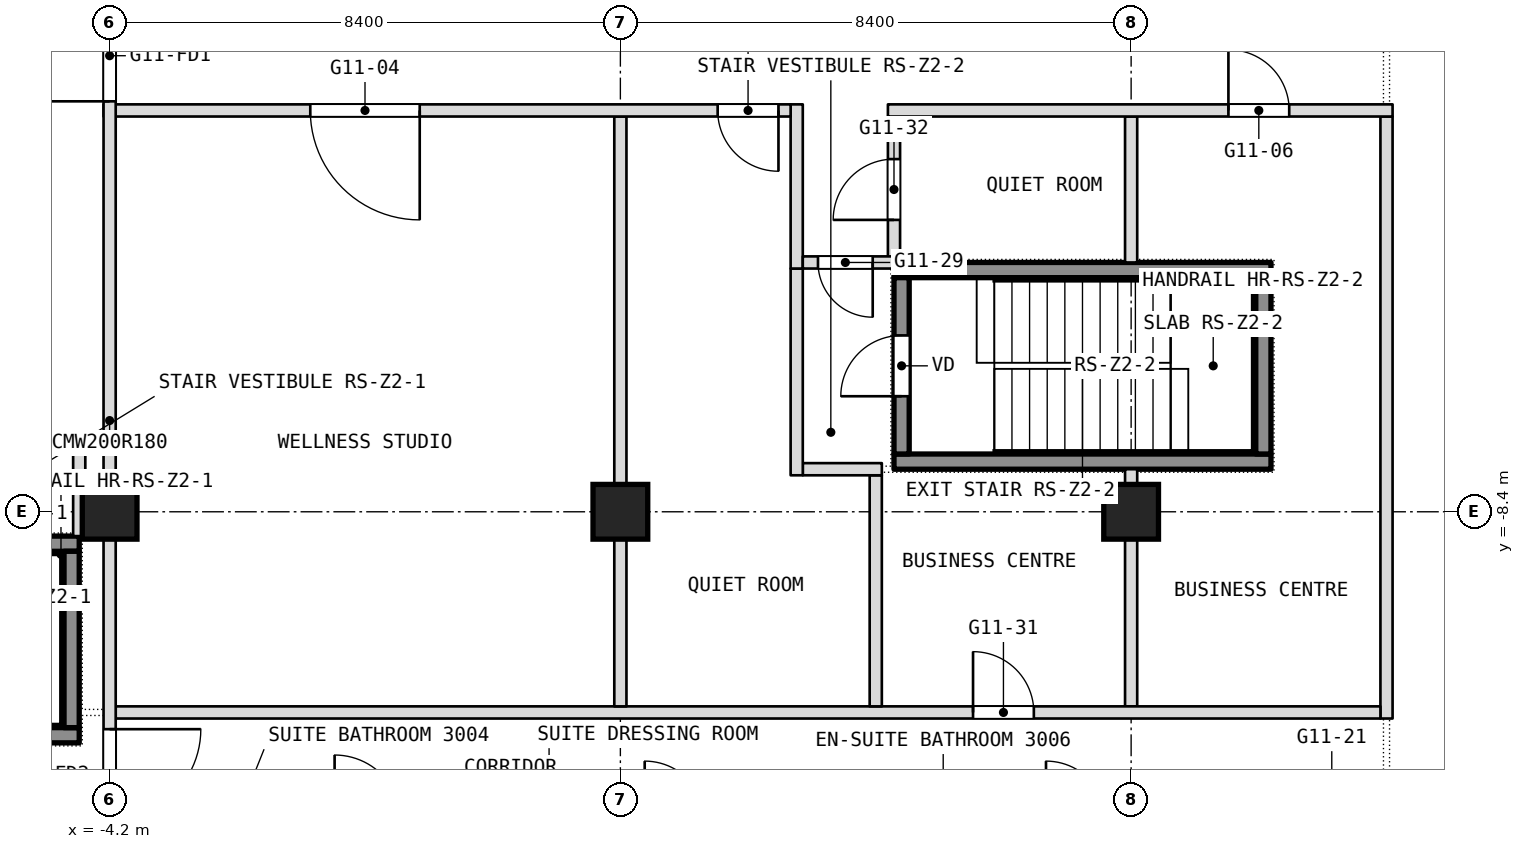
"""IFC4 building model, lengths in metres.
Left out: names, types, materials, properties, quantities, classifications, styles, units other than length and angle.
Written with IfcOpenShell. Run it as: python <this file> out.ifc"""

import sys

from ifc_helpers import new_model, si_unit, direction, frame, frame_2d, origin, origin_2d, place, context, subcontext, project, spatial, rectangle, extrude, element, fill, save


model = new_model("IFC4")
c1 = context("Model", 3, precision=1e-05, world=origin(), true_north=direction((0.0, 1.0)))
c2 = subcontext(c1, "Body", "Model", "MODEL_VIEW")
j1 = project(units=[si_unit("LENGTHUNIT", "METRE"), si_unit("PLANEANGLEUNIT", "RADIAN")], contexts=[c1])
p1 = place(None, origin())
s1 = spatial("IfcSite", under=j1, at=p1, CompositionType="ELEMENT")
p2 = place(p1, origin())
s2 = spatial("IfcBuilding", under=s1, at=p2, CompositionType="ELEMENT")
p3 = place(p2, frame((0.0, 0.0, 133.7)))
s3 = spatial("IfcBuildingStorey", under=s2, at=p3, CompositionType="ELEMENT", Elevation=133.7)
for number, where, z_axis, x_axis in (
    (1, (-4.2, -8.4, 0.0), (0.0, 0.0, 1.0), (1.0, 0.0, 0.0)),
    (2, (4.2, -8.4, 0.0), (0.0, 0.0, 1.0), (1.0, 0.0, 0.0)),
    (3, (12.6, -8.4, 0.0), (0.0, 0.0, 1.0), (1.0, 0.0, 0.0)),
):
    element("IfcColumn", number, at=place(p3, frame(where, z_axis=z_axis, x_axis=x_axis)), inside=s3, PredefinedType="COLUMN", context=c2, shape_type="SweptSolid", body=[
        extrude(rectangle(XDim=0.9, YDim=0.9, at=origin_2d()), origin(), (0.0, 0.0, 1.0), 3.6),
    ])
p4 = place(p3, frame((16.8, -11.8, 0.0), z_axis=(0.0, 0.0, 1.0), x_axis=(0.0, 1.0, 0.0)))
e4 = element("IfcWall", 4, at=p4, inside=s3, PredefinedType="PARTITIONING", context=c2, shape_type="SweptSolid", body=[
    extrude(rectangle(XDim=9.9, YDim=0.2, at=frame_2d((4.95, 0.0))), origin(), (0.0, 0.0, 1.0), 3.34),
])
p5 = place(p3, frame((12.6, -11.6, 0.0), z_axis=(0.0, 0.0, 1.0), x_axis=(0.0, 1.0, 0.0)))
e5 = element("IfcWall", 5, at=p5, inside=s3, PredefinedType="PARTITIONING", context=c2, shape_type="SweptSolid", body=[
    extrude(rectangle(XDim=3.9, YDim=0.2, at=frame_2d((1.95, 0.0))), origin(), (0.0, 0.0, 1.0), 3.34),
])
p6 = place(p3, frame((12.6, -4.3, 0.0), z_axis=(0.0, 0.0, 1.0), x_axis=(0.0, 1.0, 0.0)))
e6 = element("IfcWall", 6, at=p6, inside=s3, PredefinedType="PARTITIONING", context=c2, shape_type="SweptSolid", body=[
    extrude(rectangle(XDim=2.4, YDim=0.2, at=frame_2d((1.2, 0.0))), origin(), (0.0, 0.0, 1.0), 3.34),
])
p7 = place(p3, frame((-4.1, -11.7, 0.0), z_axis=(0.0, 0.0, 1.0), x_axis=(1.0, 0.0, 0.0)))
e7 = element("IfcWall", 7, at=p7, inside=s3, PredefinedType="PARTITIONING", context=c2, shape_type="SweptSolid", body=[
    extrude(rectangle(XDim=20.8, YDim=0.2, at=frame_2d((10.4, 0.0))), origin(), (0.0, 0.0, 1.0), 3.34),
])
p8 = place(p7, frame((14.1, 0.0, 0.0)))
e8 = element("IfcOpeningElement", 8, at=p8, cuts=e7, PredefinedType="OPENING", context=c2, shape_type="SweptSolid", body=[
    extrude(rectangle(XDim=1.0, YDim=2.1, at=frame_2d((0.5, 1.05))), frame((0.0, 0.1, 0.0), z_axis=(0.0, -1.0, 0.0), x_axis=(1.0, 0.0, 0.0)), (0.0, 0.0, 1.0), 0.2),
])
p9 = place(p3, frame((8.7, -4.3, 0.0), z_axis=(0.0, 0.0, 1.0), x_axis=(0.0, 1.0, 0.0)))
e9 = element("IfcWall", 9, at=p9, inside=s3, PredefinedType="PARTITIONING", context=c2, shape_type="SweptSolid", body=[
    extrude(rectangle(XDim=2.4, YDim=0.2, at=frame_2d((1.2, 0.0))), origin(), (0.0, 0.0, 1.0), 3.34),
])
p10 = place(p9, frame((0.7, 0.0, 0.0)))
e10 = element("IfcOpeningElement", 10, at=p10, cuts=e9, PredefinedType="OPENING", context=c2, shape_type="SweptSolid", body=[
    extrude(rectangle(XDim=1.0, YDim=2.1, at=frame_2d((0.5, 1.05))), frame((0.0, 0.1, 0.0), z_axis=(0.0, -1.0, 0.0), x_axis=(1.0, 0.0, 0.0)), (0.0, 0.0, 1.0), 0.2),
])
p11 = place(p3, frame((8.4, -11.6, 0.0), z_axis=(0.0, 0.0, 1.0), x_axis=(0.0, 1.0, 0.0)))
e11 = element("IfcWall", 11, at=p11, inside=s3, PredefinedType="PARTITIONING", context=c2, shape_type="SweptSolid", body=[
    extrude(rectangle(XDim=3.8, YDim=0.2, at=frame_2d((1.9, 0.0))), origin(), (0.0, 0.0, 1.0), 3.34),
])
p12 = place(p3, frame((7.2, -7.7, 0.0), z_axis=(0.0, 0.0, 1.0), x_axis=(1.0, 0.0, 0.0)))
e12 = element("IfcWall", 12, at=p12, inside=s3, PredefinedType="PARTITIONING", context=c2, shape_type="SweptSolid", body=[
    extrude(rectangle(XDim=1.3, YDim=0.2, at=frame_2d((0.65, 0.0))), origin(), (0.0, 0.0, 1.0), 3.34),
])
p13 = place(p3, frame((-8.5, -7.2, 0.0), z_axis=(0.0, 0.0, 1.0), x_axis=(1.0, 0.0, 0.0)))
e13 = element("IfcWall", 13, at=p13, inside=s3, PredefinedType="PARTITIONING", context=c2, shape_type="SweptSolid", body=[
    extrude(rectangle(XDim=3.7, YDim=0.2, at=frame_2d((1.85, 0.0))), origin(), (0.0, 0.0, 1.0), 3.34),
])
p14 = place(p13, frame((0.25, 0.0, 0.0)))
e14 = element("IfcOpeningElement", 14, at=p14, cuts=e13, PredefinedType="OPENING", context=c2, shape_type="SweptSolid", body=[
    extrude(rectangle(XDim=0.9, YDim=2.1, at=frame_2d((0.45, 1.05))), frame((0.0, 0.1, 0.0), z_axis=(0.0, -1.0, 0.0), x_axis=(1.0, 0.0, 0.0)), (0.0, 0.0, 1.0), 0.2),
])
p15 = place(p3, frame((7.1, -7.8, 0.0), z_axis=(0.0, 0.0, 1.0), x_axis=(0.0, 1.0, 0.0)))
e15 = element("IfcWall", 15, at=p15, inside=s3, PredefinedType="PARTITIONING", context=c2, shape_type="SweptSolid", body=[
    extrude(rectangle(XDim=3.4, YDim=0.2, at=frame_2d((1.7, 0.0))), origin(), (0.0, 0.0, 1.0), 3.34),
])
p16 = place(p3, frame((7.1, -4.4, 0.0), z_axis=(0.0, 0.0, 1.0), x_axis=(0.0, 1.0, 0.0)))
e16 = element("IfcWall", 16, at=p16, inside=s3, PredefinedType="PARTITIONING", context=c2, shape_type="SweptSolid", body=[
    extrude(rectangle(XDim=2.7, YDim=0.2, at=frame_2d((1.35, 0.0))), origin(), (0.0, 0.0, 1.0), 3.34),
])
p17 = place(p3, frame((7.2, -4.3, 0.0), z_axis=(0.0, 0.0, 1.0), x_axis=(1.0, 0.0, 0.0)))
e17 = element("IfcWall", 17, at=p17, inside=s3, PredefinedType="PARTITIONING", context=c2, shape_type="SweptSolid", body=[
    extrude(rectangle(XDim=1.5, YDim=0.2, at=frame_2d((0.75, 0.0))), origin(), (0.0, 0.0, 1.0), 3.34),
])
p18 = place(p17, frame((0.25, 0.0, 0.0)))
e18 = element("IfcOpeningElement", 18, at=p18, cuts=e17, PredefinedType="OPENING", context=c2, shape_type="SweptSolid", body=[
    extrude(rectangle(XDim=0.9, YDim=2.1, at=frame_2d((0.45, 1.05))), frame((0.0, 0.1, 0.0), z_axis=(0.0, -1.0, 0.0), x_axis=(1.0, 0.0, 0.0)), (0.0, 0.0, 1.0), 0.2),
])
p19 = place(p3, frame((4.2, -11.6, 0.0), z_axis=(0.0, 0.0, 1.0), x_axis=(0.0, 1.0, 0.0)))
e19 = element("IfcWall", 19, at=p19, inside=s3, PredefinedType="PARTITIONING", context=c2, shape_type="SweptSolid", body=[
    extrude(rectangle(XDim=9.7, YDim=0.2, at=frame_2d((4.85, 0.0))), origin(), (0.0, 0.0, 1.0), 3.34),
])
p20 = place(p3, frame((-4.3, -1.8, 0.0), z_axis=(0.0, 0.0, 1.0), x_axis=(1.0, 0.0, 0.0)))
e20 = element("IfcWall", 20, at=p20, inside=s3, PredefinedType="PARTITIONING", context=c2, shape_type="SweptSolid", body=[
    extrude(rectangle(XDim=11.3, YDim=0.2, at=frame_2d((5.65, 0.0))), origin(), (0.0, 0.0, 1.0), 3.34),
])
p21 = place(p20, frame((3.4, 0.0, 0.0)))
e21 = element("IfcOpeningElement", 21, at=p21, cuts=e20, PredefinedType="OPENING", context=c2, shape_type="SweptSolid", body=[
    extrude(rectangle(XDim=1.8, YDim=2.1, at=frame_2d((0.9, 1.05))), frame((0.0, 0.1, 0.0), z_axis=(0.0, -1.0, 0.0), x_axis=(1.0, 0.0, 0.0)), (0.0, 0.0, 1.0), 0.2),
])
p22 = place(p20, frame((10.1, 0.0, 0.0)))
e22 = element("IfcOpeningElement", 22, at=p22, cuts=e20, PredefinedType="OPENING", context=c2, shape_type="SweptSolid", body=[
    extrude(rectangle(XDim=1.0, YDim=2.1, at=frame_2d((0.5, 1.05))), frame((0.0, 0.1, 0.0), z_axis=(0.0, -1.0, 0.0), x_axis=(1.0, 0.0, 0.0)), (0.0, 0.0, 1.0), 0.2),
])
p23 = place(p3, frame((8.6, -1.8, 0.0), z_axis=(0.0, 0.0, 1.0), x_axis=(1.0, 0.0, 0.0)))
e23 = element("IfcWall", 23, at=p23, inside=s3, PredefinedType="PARTITIONING", context=c2, shape_type="SweptSolid", body=[
    extrude(rectangle(XDim=8.3, YDim=0.2, at=frame_2d((4.15, 0.0))), origin(), (0.0, 0.0, 1.0), 3.34),
])
p24 = place(p23, frame((5.6, 0.0, 0.0)))
e24 = element("IfcOpeningElement", 24, at=p24, cuts=e23, PredefinedType="OPENING", context=c2, shape_type="SweptSolid", body=[
    extrude(rectangle(XDim=1.0, YDim=2.1, at=frame_2d((0.5, 1.05))), frame((0.0, 0.1, 0.0), z_axis=(0.0, -1.0, 0.0), x_axis=(1.0, 0.0, 0.0)), (0.0, 0.0, 1.0), 0.2),
])
p25 = place(p3, frame((-4.2, -13.8, 0.0), z_axis=(0.0, 0.0, 1.0), x_axis=(0.0, 1.0, 0.0)))
e25 = element("IfcWall", 25, at=p25, inside=s3, PredefinedType="PARTITIONING", context=c2, shape_type="SweptSolid", body=[
    extrude(rectangle(XDim=13.8, YDim=0.2, at=frame_2d((6.9, 0.0))), origin(), (0.0, 0.0, 1.0), 3.34),
])
p26 = place(p25, frame((12.15, 0.0, 0.0)))
e26 = element("IfcOpeningElement", 26, at=p26, cuts=e25, PredefinedType="OPENING", context=c2, shape_type="SweptSolid", body=[
    extrude(rectangle(XDim=1.5, YDim=2.1, at=frame_2d((0.75, 1.05))), frame((0.0, 0.1, 0.0), z_axis=(0.0, -1.0, 0.0), x_axis=(1.0, 0.0, 0.0)), (0.0, 0.0, 1.0), 0.2),
])
p27 = place(p25, frame((0.325, 0.0, 0.0)))
e27 = element("IfcOpeningElement", 27, at=p27, cuts=e25, PredefinedType="OPENING", context=c2, shape_type="SweptSolid", body=[
    extrude(rectangle(XDim=1.5, YDim=2.1, at=frame_2d((0.75, 1.05))), frame((0.0, 0.1, 0.0), z_axis=(0.0, -1.0, 0.0), x_axis=(1.0, 0.0, 0.0)), (0.0, 0.0, 1.0), 0.2),
])
p28 = place(p3, frame((-4.7, -8.8, 0.0), z_axis=(0.0, 0.0, 1.0), x_axis=(0.0, 1.0, 0.0)))
e28 = element("IfcWall", 28, at=p28, inside=s3, PredefinedType="PARTITIONING", context=c2, shape_type="SweptSolid", body=[
    extrude(rectangle(XDim=1.7, YDim=0.2, at=frame_2d((0.85, 0.0))), origin(), (0.0, 0.0, 1.0), 3.34),
])
p29 = place(p3, frame((-10.9, -12.075, 0.1), z_axis=(0.0, 0.0, 1.0), x_axis=(1.0, 0.0, 0.0)))
e29 = element("IfcWall", 29, at=p29, inside=s3, PredefinedType="SHEAR", context=c2, shape_type="SweptSolid", body=[
    extrude(rectangle(XDim=6.2, YDim=0.25, at=frame_2d((3.1, 0.0))), origin(), (0.0, 0.0, 1.0), 3.6),
])
p30 = place(p3, frame((-10.9, -8.925, 0.1), z_axis=(0.0, 0.0, 1.0), x_axis=(1.0, 0.0, 0.0)))
e30 = element("IfcWall", 30, at=p30, inside=s3, PredefinedType="SHEAR", context=c2, shape_type="SweptSolid", body=[
    extrude(rectangle(XDim=6.2, YDim=0.25, at=frame_2d((3.1, 0.0))), origin(), (0.0, 0.0, 1.0), 3.6),
])
p31 = place(p30, frame((0.45, 0.0, 0.0)))
e31 = element("IfcOpeningElement", 31, at=p31, cuts=e30, PredefinedType="OPENING", context=c2, shape_type="SweptSolid", body=[
    extrude(rectangle(XDim=1.0, YDim=2.1, at=frame_2d((0.5, 1.05))), frame((0.0, 0.125, 0.0), z_axis=(0.0, -1.0, 0.0), x_axis=(1.0, 0.0, 0.0)), (0.0, 0.0, 1.0), 0.25),
])
p32 = place(p3, frame((-4.825, -11.95, 0.1), z_axis=(0.0, 0.0, 1.0), x_axis=(0.0, 1.0, 0.0)))
e32 = element("IfcWall", 32, at=p32, inside=s3, PredefinedType="SHEAR", context=c2, shape_type="SweptSolid", body=[
    extrude(rectangle(XDim=2.9, YDim=0.25, at=frame_2d((1.45, 0.0))), origin(), (0.0, 0.0, 1.0), 3.6),
])
for number, where, z_axis, x_axis in (
    (33, (8.7, -7.575, 0.1), (0.0, 0.0, 1.0), (1.0, 0.0, 0.0)),
    (34, (8.7, -4.425, 0.1), (0.0, 0.0, 1.0), (1.0, 0.0, 0.0)),
):
    element("IfcWall", number, at=place(p3, frame(where, z_axis=z_axis, x_axis=x_axis)), inside=s3, PredefinedType="SHEAR", context=c2, shape_type="SweptSolid", body=[
        extrude(rectangle(XDim=6.2, YDim=0.25, at=frame_2d((3.1, 0.0))), origin(), (0.0, 0.0, 1.0), 3.6),
    ])
p33 = place(p3, frame((8.825, -7.45, 0.1), z_axis=(0.0, 0.0, 1.0), x_axis=(0.0, 1.0, 0.0)))
e35 = element("IfcWall", 35, at=p33, inside=s3, PredefinedType="SHEAR", context=c2, shape_type="SweptSolid", body=[
    extrude(rectangle(XDim=2.9, YDim=0.25, at=frame_2d((1.45, 0.0))), origin(), (0.0, 0.0, 1.0), 3.6),
])
p34 = place(p33, frame((0.95, 0.0, 0.0)))
e36 = element("IfcOpeningElement", 36, at=p34, cuts=e35, PredefinedType="OPENING", context=c2, shape_type="SweptSolid", body=[
    extrude(rectangle(XDim=1.0, YDim=2.1, at=frame_2d((0.5, 1.05))), frame((0.0, 0.125, 0.0), z_axis=(0.0, -1.0, 0.0), x_axis=(1.0, 0.0, 0.0)), (0.0, 0.0, 1.0), 0.25),
])
p35 = place(p3, frame((14.775, -7.45, 0.1), z_axis=(0.0, 0.0, 1.0), x_axis=(0.0, 1.0, 0.0)))
e37 = element("IfcWall", 37, at=p35, inside=s3, PredefinedType="SHEAR", context=c2, shape_type="SweptSolid", body=[
    extrude(rectangle(XDim=2.9, YDim=0.25, at=frame_2d((1.45, 0.0))), origin(), (0.0, 0.0, 1.0), 3.6),
])
p36 = place(p8, origin())
e38 = element("IfcDoor", 38, at=p36, inside=s3, OperationType="SINGLE_SWING_LEFT", PredefinedType="DOOR", context=c2, shape_type="SweptSolid", body=[
    extrude(rectangle(XDim=1.0, YDim=2.1, at=frame_2d((0.5, 1.05))), frame((0.0, 0.025, 0.0), z_axis=(0.0, -1.0, 0.0), x_axis=(1.0, 0.0, 0.0)), (0.0, 0.0, 1.0), 0.05),
])
fill(e8, e38)
p37 = place(p10, origin())
e39 = element("IfcDoor", 39, at=p37, inside=s3, OperationType="SINGLE_SWING_LEFT", PredefinedType="DOOR", context=c2, shape_type="SweptSolid", body=[
    extrude(rectangle(XDim=1.0, YDim=2.1, at=frame_2d((0.5, 1.05))), frame((0.0, 0.025, 0.0), z_axis=(0.0, -1.0, 0.0), x_axis=(1.0, 0.0, 0.0)), (0.0, 0.0, 1.0), 0.05),
])
fill(e10, e39)
p38 = place(p18, origin())
e40 = element("IfcDoor", 40, at=p38, inside=s3, OperationType="SINGLE_SWING_LEFT", PredefinedType="DOOR", context=c2, shape_type="SweptSolid", body=[
    extrude(rectangle(XDim=0.9, YDim=2.1, at=frame_2d((0.45, 1.05))), frame((0.0, 0.025, 0.0), z_axis=(0.0, -1.0, 0.0), x_axis=(1.0, 0.0, 0.0)), (0.0, 0.0, 1.0), 0.05),
])
fill(e18, e40)
p39 = place(p21, origin())
e41 = element("IfcDoor", 41, at=p39, inside=s3, OperationType="DOUBLE_DOOR_SINGLE_SWING", PredefinedType="DOOR", context=c2, shape_type="SweptSolid", body=[
    extrude(rectangle(XDim=1.8, YDim=2.1, at=frame_2d((0.9, 1.05))), frame((0.0, 0.025, 0.0), z_axis=(0.0, -1.0, 0.0), x_axis=(1.0, 0.0, 0.0)), (0.0, 0.0, 1.0), 0.05),
])
fill(e21, e41)
p40 = place(p22, origin())
e42 = element("IfcDoor", 42, at=p40, inside=s3, OperationType="SINGLE_SWING_LEFT", PredefinedType="DOOR", context=c2, shape_type="SweptSolid", body=[
    extrude(rectangle(XDim=1.0, YDim=2.1, at=frame_2d((0.5, 1.05))), frame((0.0, 0.025, 0.0), z_axis=(0.0, -1.0, 0.0), x_axis=(1.0, 0.0, 0.0)), (0.0, 0.0, 1.0), 0.05),
])
fill(e22, e42)
p41 = place(p24, origin())
e43 = element("IfcDoor", 43, at=p41, inside=s3, OperationType="SINGLE_SWING_RIGHT", PredefinedType="DOOR", context=c2, shape_type="SweptSolid", body=[
    extrude(rectangle(XDim=1.0, YDim=2.1, at=frame_2d((0.5, 1.05))), frame((0.0, 0.025, 0.0), z_axis=(0.0, -1.0, 0.0), x_axis=(1.0, 0.0, 0.0)), (0.0, 0.0, 1.0), 0.05),
])
fill(e24, e43)
p42 = place(p34, origin())
e44 = element("IfcDoor", 44, at=p42, inside=s3, OperationType="SINGLE_SWING_LEFT", PredefinedType="DOOR", context=c2, shape_type="SweptSolid", body=[
    extrude(rectangle(XDim=1.0, YDim=2.1, at=frame_2d((0.5, 1.05))), frame((0.0, 0.025, 0.0), z_axis=(0.0, -1.0, 0.0), x_axis=(1.0, 0.0, 0.0)), (0.0, 0.0, 1.0), 0.05),
])
fill(e36, e44)
p43 = place(p26, origin())
e45 = element("IfcDoor", 45, at=p43, inside=s3, OperationType="DOUBLE_DOOR_DOUBLE_SWING", PredefinedType="DOOR", context=c2, shape_type="SweptSolid", body=[
    extrude(rectangle(XDim=1.5, YDim=2.1, at=frame_2d((0.75, 1.05))), frame((0.0, 0.025, 0.0), z_axis=(0.0, -1.0, 0.0), x_axis=(1.0, 0.0, 0.0)), (0.0, 0.0, 1.0), 0.05),
])
fill(e26, e45)
p44 = place(p27, origin())
e46 = element("IfcDoor", 46, at=p44, inside=s3, OperationType="DOUBLE_DOOR_DOUBLE_SWING", PredefinedType="DOOR", context=c2, shape_type="SweptSolid", body=[
    extrude(rectangle(XDim=1.5, YDim=2.1, at=frame_2d((0.75, 1.05))), frame((0.0, 0.025, 0.0), z_axis=(0.0, -1.0, 0.0), x_axis=(1.0, 0.0, 0.0)), (0.0, 0.0, 1.0), 0.05),
])
fill(e27, e46)
save(model, sys.argv[1])
